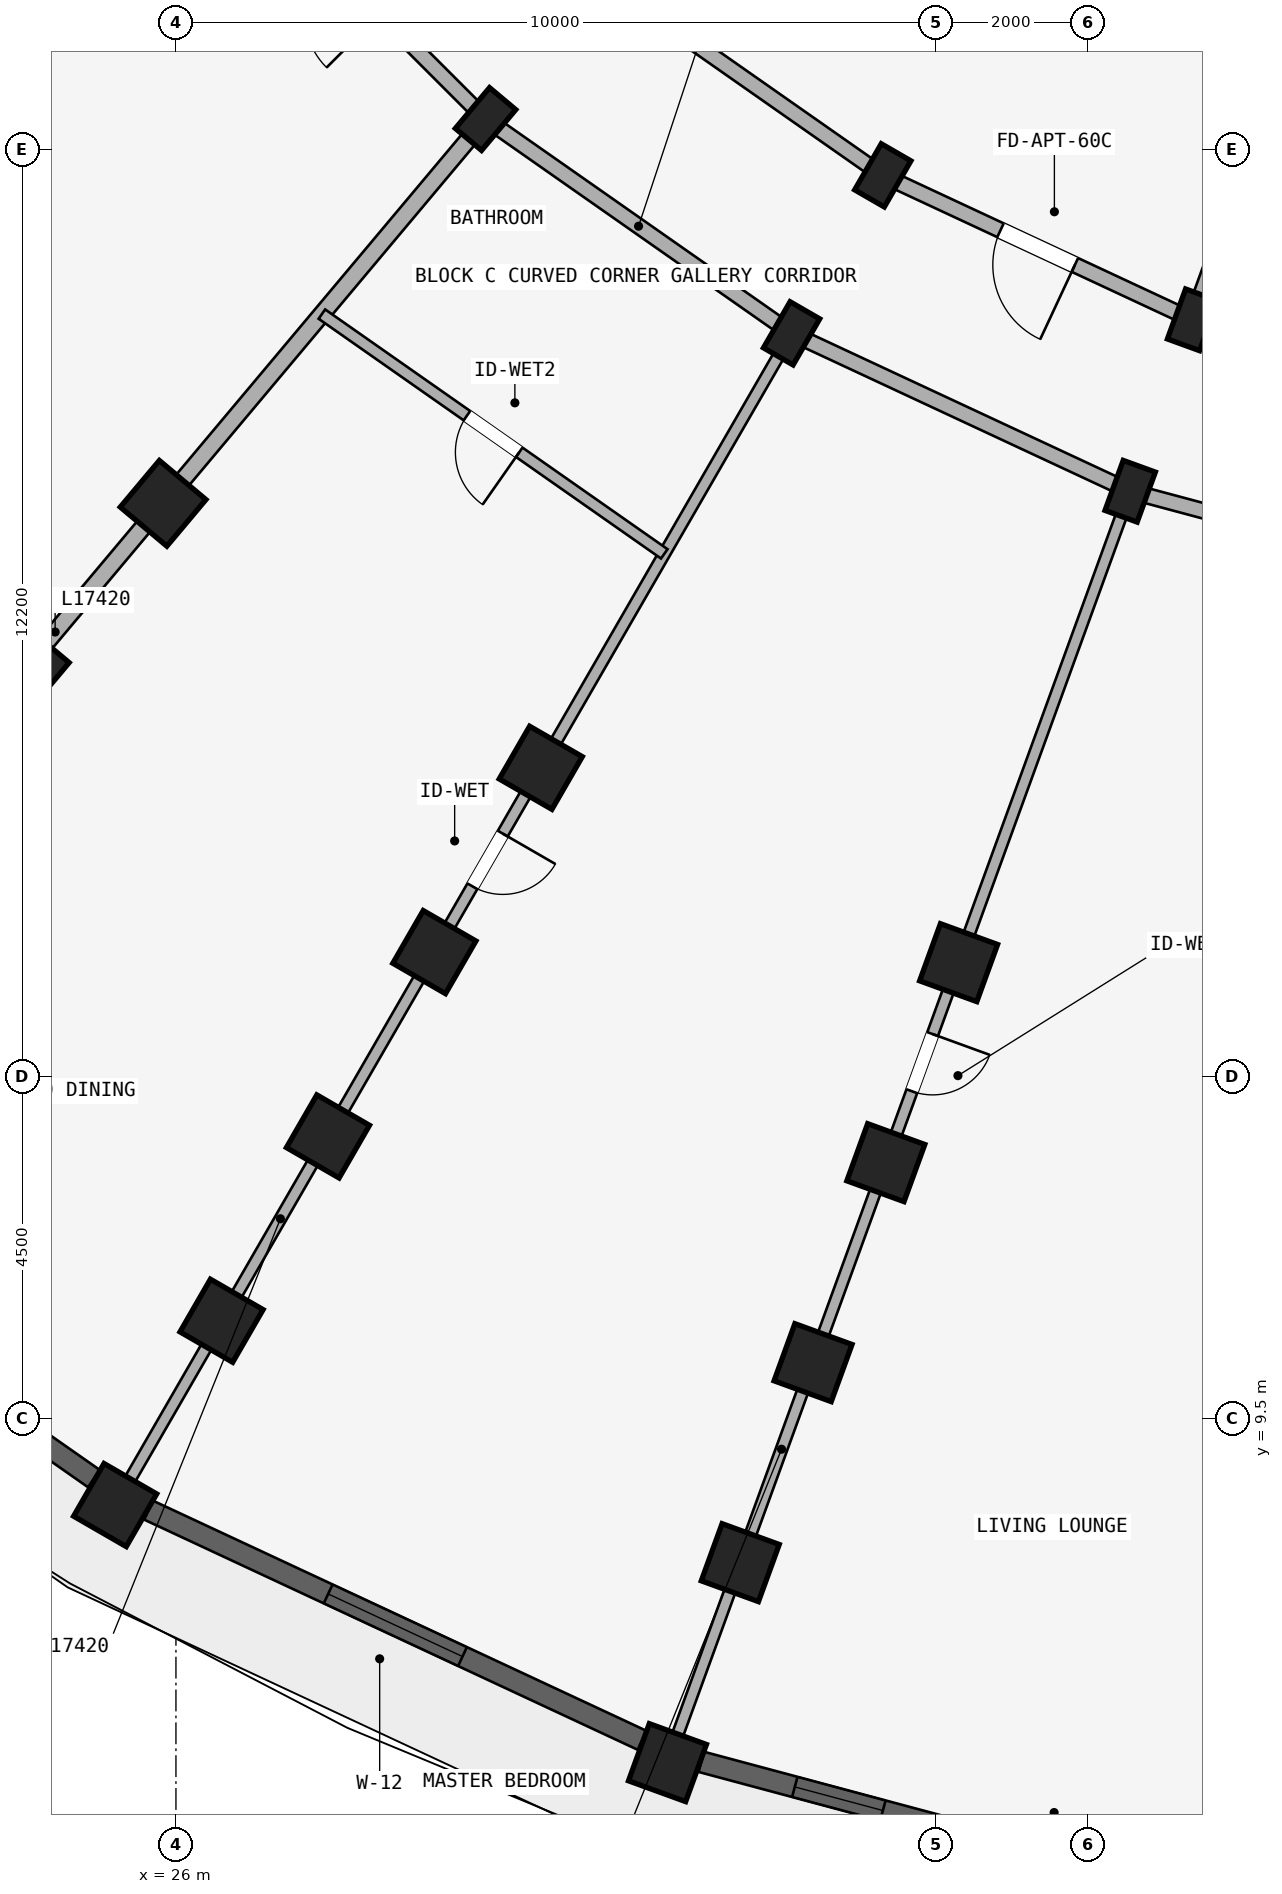
"""IFC4 building model, lengths in metres.
Left out: names, types, materials, properties, quantities, classifications, styles, units other than length and angle.
Written with IfcOpenShell. Run it as: python <this file> out.ifc"""

import sys

from ifc_helpers import new_model, si_unit, direction, frame, frame_2d, origin, origin_2d, place, context, subcontext, project, spatial, rectangle, extrude, element, fill, save


model = new_model("IFC4")
c1 = context("Model", 3, precision=1e-05, world=origin(), true_north=direction((0.0, 1.0)))
c2 = subcontext(c1, "Body", "Model", "MODEL_VIEW")
j1 = project(units=[si_unit("LENGTHUNIT", "METRE"), si_unit("PLANEANGLEUNIT", "RADIAN")], contexts=[c1])
p1 = place(None, origin())
s1 = spatial("IfcSite", under=j1, at=p1, CompositionType="ELEMENT")
p2 = place(p1, origin())
s2 = spatial("IfcBuilding", under=s1, at=p2, CompositionType="ELEMENT")
p3 = place(p2, frame((0.0, 0.0, 15.0)))
s3 = spatial("IfcBuildingStorey", under=s2, at=p3, CompositionType="ELEMENT", Elevation=15.0)
for number, where, z_axis, x_axis in (
    (1, (39.376, 23.956, 0.0), (0.0, 0.0, 1.0), (-0.94, 0.342, 0.0)),
    (2, (38.555, 21.701, 0.0), (0.0, 0.0, 1.0), (-0.94, 0.342, 0.0)),
):
    element("IfcColumn", number, at=place(p3, frame(where, z_axis=z_axis, x_axis=x_axis)), inside=s3, PredefinedType="COLUMN", context=c2, shape_type="SweptSolid", body=[
        extrude(rectangle(XDim=0.45, YDim=0.7, at=origin_2d()), origin(), (0.0, 0.0, 1.0), 2.93),
    ])
for number, where, z_axis, x_axis in (
    (3, (36.298, 15.499, 0.0), (0.0, 0.0, 1.0), (-0.94, 0.342, 0.0)),
    (4, (35.34, 12.868, 0.0), (0.0, 0.0, 1.0), (-0.94, 0.342, 0.0)),
    (5, (34.382, 10.236, 0.0), (0.0, 0.0, 1.0), (-0.94, 0.342, 0.0)),
    (6, (33.425, 7.605, 0.0), (0.0, 0.0, 1.0), (-0.94, 0.342, 0.0)),
    (7, (32.467, 4.974, 0.0), (0.0, 0.0, 1.0), (-0.94, 0.342, 0.0)),
):
    element("IfcColumn", number, at=place(p3, frame(where, z_axis=z_axis, x_axis=x_axis)), inside=s3, PredefinedType="COLUMN", context=c2, shape_type="SweptSolid", body=[
        extrude(rectangle(XDim=0.8, YDim=0.8, at=origin_2d()), origin(), (0.0, 0.0, 1.0), 2.93),
    ])
for number, where, z_axis, x_axis in (
    (8, (35.3, 25.856, 0.0), (0.0, 0.0, 1.0), (-0.866, 0.5, 0.0)),
    (9, (34.1, 23.778, 0.0), (0.0, 0.0, 1.0), (-0.866, 0.5, 0.0)),
):
    element("IfcColumn", number, at=place(p3, frame(where, z_axis=z_axis, x_axis=x_axis)), inside=s3, PredefinedType="COLUMN", context=c2, shape_type="SweptSolid", body=[
        extrude(rectangle(XDim=0.45, YDim=0.7, at=origin_2d()), origin(), (0.0, 0.0, 1.0), 2.93),
    ])
for number, where, z_axis, x_axis in (
    (10, (30.8, 18.062, 0.0), (0.0, 0.0, 1.0), (-0.866, 0.5, 0.0)),
    (11, (29.4, 15.637, 0.0), (0.0, 0.0, 1.0), (-0.866, 0.5, 0.0)),
    (12, (28.0, 13.213, 0.0), (0.0, 0.0, 1.0), (-0.866, 0.5, 0.0)),
    (13, (26.6, 10.788, 0.0), (0.0, 0.0, 1.0), (-0.866, 0.5, 0.0)),
    (14, (25.2, 8.363, 0.0), (0.0, 0.0, 1.0), (-0.866, 0.5, 0.0)),
):
    element("IfcColumn", number, at=place(p3, frame(where, z_axis=z_axis, x_axis=x_axis)), inside=s3, PredefinedType="COLUMN", context=c2, shape_type="SweptSolid", body=[
        extrude(rectangle(XDim=0.8, YDim=0.8, at=origin_2d()), origin(), (0.0, 0.0, 1.0), 2.93),
    ])
p4 = place(p3, frame((30.073, 26.598, 0.0), z_axis=(0.0, 0.0, 1.0), x_axis=(-0.766044443119, 0.642787609687, 0.0)))
e15 = element("IfcColumn", 15, at=p4, inside=s3, PredefinedType="COLUMN", context=c2, shape_type="SweptSolid", body=[
    extrude(rectangle(XDim=0.45, YDim=0.7, at=origin_2d()), origin(), (0.0, 0.0, 1.0), 2.93),
])
for number, where, z_axis, x_axis in (
    (16, (25.831, 21.542, 0.0), (0.0, 0.0, 1.0), (-0.766, 0.643, 0.0)),
    (17, (24.031, 19.397, 0.0), (0.0, 0.0, 1.0), (-0.766, 0.643, 0.0)),
):
    element("IfcColumn", number, at=place(p3, frame(where, z_axis=z_axis, x_axis=x_axis)), inside=s3, PredefinedType="COLUMN", context=c2, shape_type="SweptSolid", body=[
        extrude(rectangle(XDim=0.8, YDim=0.8, at=origin_2d()), origin(), (0.0, 0.0, 1.0), 2.93),
    ])
p5 = place(p3, frame((43.72, 22.792, 0.0), z_axis=(0.0, 0.0, 1.0), x_axis=(-0.965934240054, 0.258787642463, 0.0)))
e18 = element("IfcWall", 18, at=p5, inside=s3, PredefinedType="STANDARD", context=c2, shape_type="SweptSolid", body=[
    extrude(rectangle(XDim=4.497, YDim=0.2, at=frame_2d((2.249, 0.0))), origin(), (0.0, 0.0, 1.0), 2.372),
])
p6 = place(p3, frame((43.303, 20.428, 0.0), z_axis=(0.0, 0.0, 1.0), x_axis=(-0.965930095386, 0.258803112091, 0.0)))
e19 = element("IfcWall", 19, at=p6, inside=s3, PredefinedType="STANDARD", context=c2, shape_type="SweptSolid", body=[
    extrude(rectangle(XDim=4.916, YDim=0.2, at=frame_2d((2.458, 0.0))), origin(), (0.0, 0.0, 1.0), 2.372),
])
p7 = place(p6, frame((1.888, 0.0, 0.0)))
e20 = element("IfcOpeningElement", 20, at=p7, cuts=e19, PredefinedType="OPENING", context=c2, shape_type="SweptSolid", body=[
    extrude(rectangle(XDim=1.14, YDim=2.15, at=frame_2d((0.57, 1.075))), frame((0.0, 0.11, 0.0), z_axis=(0.0, -1.0, 0.0), x_axis=(1.0, 0.0, 0.0)), (0.0, 0.0, 1.0), 0.22),
])
p8 = place(p3, frame((39.376, 23.956, 0.0), z_axis=(0.0, 0.0, 1.0), x_axis=(-0.906307919131, 0.422617978463, 0.0)))
e21 = element("IfcWall", 21, at=p8, inside=s3, PredefinedType="STANDARD", context=c2, shape_type="SweptSolid", body=[
    extrude(rectangle(XDim=4.497, YDim=0.2, at=frame_2d((2.249, 0.0))), origin(), (0.0, 0.0, 1.0), 2.372),
])
p9 = place(p8, frame((1.709, 0.0, 0.0)))
e22 = element("IfcOpeningElement", 22, at=p9, cuts=e21, PredefinedType="OPENING", context=c2, shape_type="SweptSolid", body=[
    extrude(rectangle(XDim=1.08, YDim=2.15, at=frame_2d((0.54, 1.075))), frame((0.0, 0.11, 0.0), z_axis=(0.0, -1.0, 0.0), x_axis=(1.0, 0.0, 0.0)), (0.0, 0.0, 1.0), 0.22),
])
p10 = place(p3, frame((38.555, 21.701, 0.0), z_axis=(0.0, 0.0, 1.0), x_axis=(-0.906302381024, 0.422629854778, 0.0)))
e23 = element("IfcWall", 23, at=p10, inside=s3, PredefinedType="STANDARD", context=c2, shape_type="SweptSolid", body=[
    extrude(rectangle(XDim=4.915, YDim=0.2, at=frame_2d((2.458, 0.0))), origin(), (0.0, 0.0, 1.0), 2.372),
])
p11 = place(p3, frame((35.3, 25.856, 0.0), z_axis=(0.0, 0.0, 1.0), x_axis=(-0.819155404658, 0.573571637217, 0.0)))
e24 = element("IfcWall", 24, at=p11, inside=s3, PredefinedType="STANDARD", context=c2, shape_type="SweptSolid", body=[
    extrude(rectangle(XDim=4.497, YDim=0.2, at=frame_2d((2.249, 0.0))), origin(), (0.0, 0.0, 1.0), 2.372),
])
p12 = place(p3, frame((34.1, 23.778, 0.0), z_axis=(0.0, 0.0, 1.0), x_axis=(-0.819140911474, 0.573592335331, 0.0)))
e25 = element("IfcWall", 25, at=p12, inside=s3, PredefinedType="STANDARD", context=c2, shape_type="SweptSolid", body=[
    extrude(rectangle(XDim=4.916, YDim=0.2, at=frame_2d((2.458, 0.0))), origin(), (0.0, 0.0, 1.0), 2.372),
])
p13 = place(p3, frame((30.073, 26.598, 0.0), z_axis=(0.0, 0.0, 1.0), x_axis=(-0.707106781187, 0.707106781187, 0.0)))
e26 = element("IfcWall", 26, at=p13, inside=s3, PredefinedType="STANDARD", context=c2, shape_type="SweptSolid", body=[
    extrude(rectangle(XDim=4.916, YDim=0.2, at=frame_2d((2.458, 0.0))), origin(), (0.0, 0.0, 1.0), 2.372),
])
p14 = place(p13, frame((1.958, 0.0, 0.0)))
e27 = element("IfcOpeningElement", 27, at=p14, cuts=e26, PredefinedType="OPENING", context=c2, shape_type="SweptSolid", body=[
    extrude(rectangle(XDim=1.0, YDim=2.15, at=frame_2d((0.5, 1.075))), frame((0.0, 0.11, 0.0), z_axis=(0.0, -1.0, 0.0), x_axis=(1.0, 0.0, 0.0)), (0.0, 0.0, 1.0), 0.22),
])
p15 = place(p3, frame((41.702, 30.346, 0.0), z_axis=(0.0, 0.0, 1.0), x_axis=(-0.342010221662, -0.939696231917, 0.0)))
e28 = element("IfcWall", 28, at=p15, inside=s3, PredefinedType="STANDARD", context=c2, shape_type="SweptSolid", body=[
    extrude(rectangle(XDim=6.75, YDim=0.22, at=frame_2d((3.375, 0.0))), origin(), (0.0, 0.0, 1.0), 2.372),
])
p16 = place(p3, frame((38.521, 21.607, 0.0), z_axis=(0.0, 0.0, 1.0), x_axis=(-0.342022120477, -0.939691901159, 0.0)))
e29 = element("IfcWall", 29, at=p16, inside=s3, PredefinedType="PARTITIONING", context=c2, shape_type="SweptSolid", body=[
    extrude(rectangle(XDim=17.42, YDim=0.15, at=frame_2d((8.71, 0.0))), origin(), (0.0, 0.0, 1.0), 2.372),
])
p17 = place(p16, frame((7.5, 0.0, 0.0)))
e30 = element("IfcOpeningElement", 30, at=p17, cuts=e29, PredefinedType="OPENING", context=c2, shape_type="SweptSolid", body=[
    extrude(rectangle(XDim=0.8, YDim=2.1, at=frame_2d((0.4, 1.05))), frame((0.0, 0.085, 0.0), z_axis=(0.0, -1.0, 0.0), x_axis=(1.0, 0.0, 0.0)), (0.0, 0.0, 1.0), 0.17),
])
p18 = place(p3, frame((34.05, 23.691, 0.0), z_axis=(0.0, 0.0, 1.0), x_axis=(-0.499997843263, -0.866026648973, 0.0)))
e31 = element("IfcWall", 31, at=p18, inside=s3, PredefinedType="PARTITIONING", context=c2, shape_type="SweptSolid", body=[
    extrude(rectangle(XDim=17.42, YDim=0.15, at=frame_2d((8.71, 0.0))), origin(), (0.0, 0.0, 1.0), 2.372),
])
p19 = place(p18, frame((7.5, 0.0, 0.0)))
e32 = element("IfcOpeningElement", 32, at=p19, cuts=e31, PredefinedType="OPENING", context=c2, shape_type="SweptSolid", body=[
    extrude(rectangle(XDim=0.8, YDim=2.1, at=frame_2d((0.4, 1.05))), frame((0.0, 0.085, 0.0), z_axis=(0.0, -1.0, 0.0), x_axis=(1.0, 0.0, 0.0)), (0.0, 0.0, 1.0), 0.17),
])
p20 = place(p3, frame((30.009, 26.521, 0.0), z_axis=(0.0, 0.0, 1.0), x_axis=(-0.642784757967, -0.766046835987, 0.0)))
e33 = element("IfcWall", 33, at=p20, inside=s3, PredefinedType="STANDARD", context=c2, shape_type="SweptSolid", body=[
    extrude(rectangle(XDim=17.42, YDim=0.22, at=frame_2d((8.71, 0.0))), origin(), (0.0, 0.0, 1.0), 2.372),
])
p21 = place(p3, frame((26.521, 30.009, 0.0), z_axis=(0.0, 0.0, 1.0), x_axis=(-0.766046835987, -0.642784757967, 0.0)))
e34 = element("IfcWall", 34, at=p21, inside=s3, PredefinedType="PARTITIONING", context=c2, shape_type="SweptSolid", body=[
    extrude(rectangle(XDim=17.42, YDim=0.15, at=frame_2d((8.71, 0.0))), origin(), (0.0, 0.0, 1.0), 2.372),
])
p22 = place(p21, frame((7.5, 0.0, 0.0)))
e35 = element("IfcOpeningElement", 35, at=p22, cuts=e34, PredefinedType="OPENING", context=c2, shape_type="SweptSolid", body=[
    extrude(rectangle(XDim=0.8, YDim=2.1, at=frame_2d((0.4, 1.05))), frame((0.0, 0.085, 0.0), z_axis=(0.0, -1.0, 0.0), x_axis=(1.0, 0.0, 0.0)), (0.0, 0.0, 1.0), 0.17),
])
p23 = place(p3, frame((32.425, 20.877, 0.0), z_axis=(0.0, 0.0, 1.0), x_axis=(-0.819156831143, 0.573569599955, 0.0)))
e36 = element("IfcWall", 36, at=p23, inside=s3, PredefinedType="PLUMBINGWALL", context=c2, shape_type="SweptSolid", body=[
    extrude(rectangle(XDim=5.5, YDim=0.15, at=frame_2d((2.75, 0.0))), origin(), (0.0, 0.0, 1.0), 2.372),
])
p24 = place(p23, frame((2.33, 0.0, 0.0)))
e37 = element("IfcOpeningElement", 37, at=p24, cuts=e36, PredefinedType="OPENING", context=c2, shape_type="SweptSolid", body=[
    extrude(rectangle(XDim=0.84, YDim=2.1, at=frame_2d((0.42, 1.05))), frame((0.0, 0.085, 0.0), z_axis=(0.0, -1.0, 0.0), x_axis=(1.0, 0.0, 0.0)), (0.0, 0.0, 1.0), 0.17),
])
p25 = place(p3, frame((39.832, 3.13, 0.0), z_axis=(0.0, 0.0, 1.0), x_axis=(-0.965923712619, 0.258826933296, 0.0)))
e38 = element("IfcWall", 38, at=p25, inside=s3, PredefinedType="STANDARD", context=c2, shape_type="SweptSolid", body=[
    extrude(rectangle(XDim=7.164, YDim=0.275, at=frame_2d((3.582, 0.0))), origin(), (0.0, 0.0, 1.0), 2.472),
])
p26 = place(p25, frame((4.69, 0.0, 0.472)))
e39 = element("IfcOpeningElement", 39, at=p26, cuts=e38, PredefinedType="OPENING", context=c2, shape_type="SweptSolid", body=[
    extrude(rectangle(XDim=1.2, YDim=1.5, at=frame_2d((0.6, 0.75))), frame((0.0, 0.147, 0.0), z_axis=(0.0, -1.0, 0.0), x_axis=(1.0, 0.0, 0.0)), (0.0, 0.0, 1.0), 0.295),
])
p27 = place(p25, frame((1.877, 0.0, 0.0)))
e40 = element("IfcOpeningElement", 40, at=p27, cuts=e38, PredefinedType="OPENING", context=c2, shape_type="SweptSolid", body=[
    extrude(rectangle(XDim=1.26, YDim=2.15, at=frame_2d((0.63, 1.075))), frame((0.0, 0.147, 0.0), z_axis=(0.0, -1.0, 0.0), x_axis=(1.0, 0.0, 0.0)), (0.0, 0.0, 1.0), 0.295),
])
p28 = place(p3, frame((32.133, 5.268, 0.0), z_axis=(0.0, 0.0, 1.0), x_axis=(-0.906300636296, 0.422633596215, 0.0)))
e41 = element("IfcWall", 41, at=p28, inside=s3, PredefinedType="STANDARD", context=c2, shape_type="SweptSolid", body=[
    extrude(rectangle(XDim=7.164, YDim=0.275, at=frame_2d((3.582, 0.0))), origin(), (0.0, 0.0, 1.0), 2.472),
])
p29 = place(p28, frame((2.607, 0.0, 0.422)))
e42 = element("IfcOpeningElement", 42, at=p29, cuts=e41, PredefinedType="OPENING", context=c2, shape_type="SweptSolid", body=[
    extrude(rectangle(XDim=1.95, YDim=1.85, at=frame_2d((0.975, 0.925))), frame((0.0, 0.147, 0.0), z_axis=(0.0, -1.0, 0.0), x_axis=(1.0, 0.0, 0.0)), (0.0, 0.0, 1.0), 0.295),
])
p30 = place(p3, frame((24.922, 8.71, 0.0), z_axis=(0.0, 0.0, 1.0), x_axis=(-0.819161471697, 0.573562972382, 0.0)))
e43 = element("IfcWall", 43, at=p30, inside=s3, PredefinedType="STANDARD", context=c2, shape_type="SweptSolid", body=[
    extrude(rectangle(XDim=7.164, YDim=0.275, at=frame_2d((3.582, 0.0))), origin(), (0.0, 0.0, 1.0), 2.472),
])
p31 = place(p30, frame((2.682, 0.0, 0.622)))
e44 = element("IfcOpeningElement", 44, at=p31, cuts=e43, PredefinedType="OPENING", context=c2, shape_type="SweptSolid", body=[
    extrude(rectangle(XDim=1.8, YDim=1.65, at=frame_2d((0.9, 0.825))), frame((0.0, 0.147, 0.0), z_axis=(0.0, -1.0, 0.0), x_axis=(1.0, 0.0, 0.0)), (0.0, 0.0, 1.0), 0.295),
])
p32 = place(p26, origin())
e45 = element("IfcWindow", 45, at=p32, inside=s3, PartitioningType="SINGLE_PANEL", PredefinedType="WINDOW", context=c2, shape_type="SweptSolid", body=[
    extrude(rectangle(XDim=1.2, YDim=1.5, at=frame_2d((0.6, 0.75))), frame((0.0, 0.03, 0.0), z_axis=(0.0, -1.0, 0.0), x_axis=(1.0, 0.0, 0.0)), (0.0, 0.0, 1.0), 0.06),
])
fill(e39, e45)
p33 = place(p29, origin())
e46 = element("IfcWindow", 46, at=p33, inside=s3, PartitioningType="DOUBLE_PANEL_VERTICAL", PredefinedType="WINDOW", context=c2, shape_type="SweptSolid", body=[
    extrude(rectangle(XDim=1.95, YDim=1.85, at=frame_2d((0.975, 0.925))), frame((0.0, 0.03, 0.0), z_axis=(0.0, -1.0, 0.0), x_axis=(1.0, 0.0, 0.0)), (0.0, 0.0, 1.0), 0.06),
])
fill(e42, e46)
p34 = place(p17, frame((0.8, 0.0, 0.0), z_axis=(0.0, 0.0, 1.0), x_axis=(-1.0, 0.0, 0.0)))
e47 = element("IfcDoor", 47, at=p34, inside=s3, OperationType="SINGLE_SWING_RIGHT", PredefinedType="DOOR", context=c2, shape_type="SweptSolid", body=[
    extrude(rectangle(XDim=0.8, YDim=2.1, at=frame_2d((0.4, 1.05))), frame((0.0, 0.025, 0.0), z_axis=(0.0, -1.0, 0.0), x_axis=(1.0, 0.0, 0.0)), (0.0, 0.0, 1.0), 0.05),
])
fill(e30, e47)
p35 = place(p19, origin())
e48 = element("IfcDoor", 48, at=p35, inside=s3, OperationType="SINGLE_SWING_LEFT", PredefinedType="DOOR", context=c2, shape_type="SweptSolid", body=[
    extrude(rectangle(XDim=0.8, YDim=2.1, at=frame_2d((0.4, 1.05))), frame((0.0, 0.025, 0.0), z_axis=(0.0, -1.0, 0.0), x_axis=(1.0, 0.0, 0.0)), (0.0, 0.0, 1.0), 0.05),
])
fill(e32, e48)
p36 = place(p24, origin())
e49 = element("IfcDoor", 49, at=p36, inside=s3, OperationType="SINGLE_SWING_LEFT", PredefinedType="DOOR", context=c2, shape_type="SweptSolid", body=[
    extrude(rectangle(XDim=0.84, YDim=2.1, at=frame_2d((0.42, 1.05))), frame((0.0, 0.025, 0.0), z_axis=(0.0, -1.0, 0.0), x_axis=(1.0, 0.0, 0.0)), (0.0, 0.0, 1.0), 0.05),
])
fill(e37, e49)
p37 = place(p9, origin())
e50 = element("IfcDoor", 50, at=p37, inside=s3, OperationType="SINGLE_SWING_LEFT", PredefinedType="DOOR", context=c2, shape_type="SweptSolid", body=[
    extrude(rectangle(XDim=1.08, YDim=2.15, at=frame_2d((0.54, 1.075))), frame((0.0, 0.025, 0.0), z_axis=(0.0, -1.0, 0.0), x_axis=(1.0, 0.0, 0.0)), (0.0, 0.0, 1.0), 0.05),
])
fill(e22, e50)
save(model, sys.argv[1])
